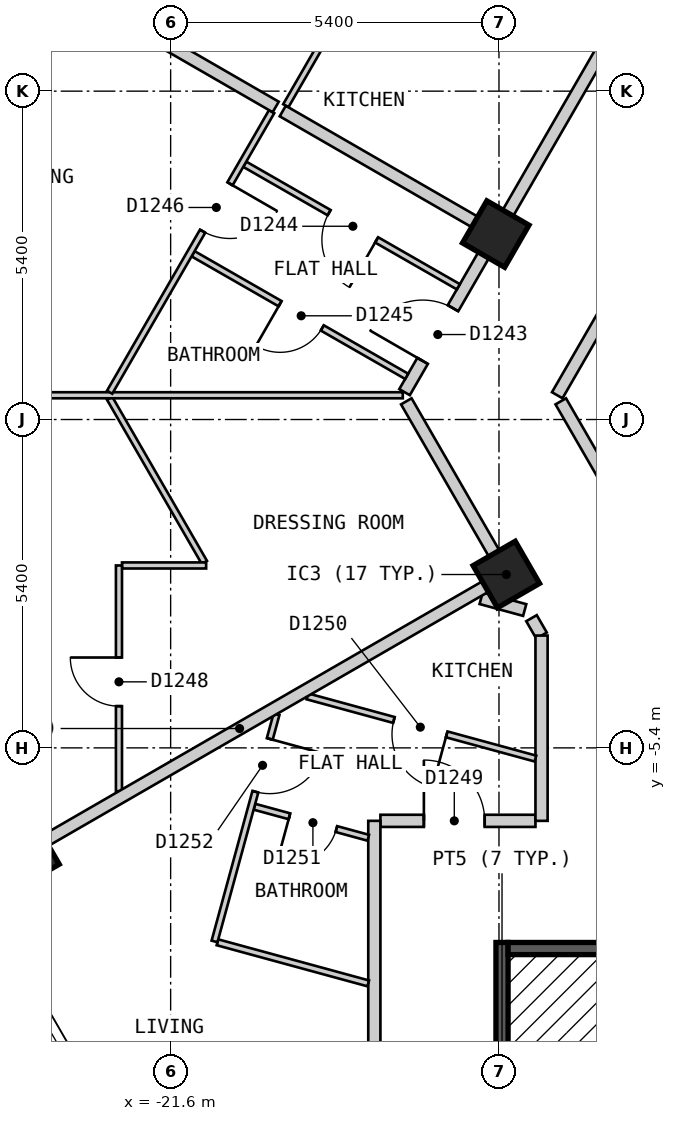
"""IFC4 building model, lengths in metres.
Left out: names, types, materials, properties, quantities, classifications, styles, units other than length and angle.
Written with IfcOpenShell. Run it as: python <this file> out.ifc"""

import sys

from ifc_helpers import new_model, si_unit, direction, frame, frame_2d, origin, origin_2d, place, context, subcontext, project, spatial, polyline, rectangle, outline, extrude, element, fill, save


model = new_model("IFC4")
c1 = context("Model", 3, precision=1e-05, world=origin(), true_north=direction((0.0, 1.0)))
c2 = subcontext(c1, "Body", "Model", "MODEL_VIEW")
j1 = project(units=[si_unit("LENGTHUNIT", "METRE"), si_unit("PLANEANGLEUNIT", "RADIAN")], contexts=[c1])
p1 = place(None, origin())
s1 = spatial("IfcSite", under=j1, at=p1, CompositionType="ELEMENT")
p2 = place(p1, origin())
s2 = spatial("IfcBuilding", under=s1, at=p2, CompositionType="ELEMENT")
p3 = place(p2, frame((0.0, 0.0, 117.6)))
s3 = spatial("IfcBuildingStorey", under=s2, at=p3, CompositionType="ELEMENT", Elevation=117.6)
p4 = place(p3, frame((-24.047, -7.149, 0.0), z_axis=(0.0, 0.0, 1.0), x_axis=(0.5, -0.866025403784, 0.0)))
e1 = element("IfcColumn", 1, at=p4, inside=s3, PredefinedType="COLUMN", context=c2, shape_type="SweptSolid", body=[
    extrude(rectangle(XDim=0.9, YDim=0.9, at=origin_2d()), origin(), (0.0, 0.0, 1.0), 3.0),
])
for number, where, z_axis, x_axis in (
    (2, (-16.079, -2.549, 0.0), (0.0, 0.0, 1.0), (0.5, -0.866, 0.0)),
    (3, (-16.253, 3.05, 0.0), (0.0, 0.0, 1.0), (-0.5, -0.866, 0.0)),
):
    element("IfcColumn", number, at=place(p3, frame(where, z_axis=z_axis, x_axis=x_axis)), inside=s3, PredefinedType="COLUMN", context=c2, shape_type="SweptSolid", body=[
        extrude(rectangle(XDim=0.8, YDim=0.8, at=origin_2d()), origin(), (0.0, 0.0, 1.0), 3.0),
    ])
p5 = place(p3, frame((-16.555, 23.025, 0.0), z_axis=(0.0, 0.0, 1.0), x_axis=(-0.500020536353, -0.866013546791, 0.0)))
e4 = element("IfcWall", 4, at=p5, inside=s3, PredefinedType="SOLIDWALL", context=c2, shape_type="SweptSolid", body=[
    extrude(outline(polyline([(0.0, -0.15), (23.325, -0.15), (23.245, 0.15), (0.08, 0.15), (0.0, -0.15)])), origin(), (0.0, 0.0, 1.0), 2.7),
])
p6 = place(p5, frame((2.685, 0.0, 0.15)))
e5 = element("IfcOpeningElement", 5, at=p6, cuts=e4, PredefinedType="OPENING", context=c2, shape_type="SweptSolid", body=[
    extrude(rectangle(XDim=1.5, YDim=2.1, at=frame_2d((0.75, 1.05))), frame((0.0, 0.16, 0.0), z_axis=(0.0, -1.0, 0.0), x_axis=(1.0, 0.0, 0.0)), (0.0, 0.0, 1.0), 0.32),
])
p7 = place(p5, frame((8.171, 0.0, 0.15)))
e6 = element("IfcOpeningElement", 6, at=p7, cuts=e4, PredefinedType="OPENING", context=c2, shape_type="SweptSolid", body=[
    extrude(rectangle(XDim=1.5, YDim=2.1, at=frame_2d((0.75, 1.05))), frame((0.0, 0.16, 0.0), z_axis=(0.0, -1.0, 0.0), x_axis=(1.0, 0.0, 0.0)), (0.0, 0.0, 1.0), 0.32),
])
p8 = place(p5, frame((13.655, 0.0, 0.15)))
e7 = element("IfcOpeningElement", 7, at=p8, cuts=e4, PredefinedType="OPENING", context=c2, shape_type="SweptSolid", body=[
    extrude(rectangle(XDim=1.5, YDim=2.1, at=frame_2d((0.75, 1.05))), frame((0.0, 0.16, 0.0), z_axis=(0.0, -1.0, 0.0), x_axis=(1.0, 0.0, 0.0)), (0.0, 0.0, 1.0), 0.32),
])
p9 = place(p5, frame((19.14, 0.0, 0.15)))
e8 = element("IfcOpeningElement", 8, at=p9, cuts=e4, PredefinedType="OPENING", context=c2, shape_type="SweptSolid", body=[
    extrude(rectangle(XDim=1.5, YDim=2.1, at=frame_2d((0.75, 1.05))), frame((0.0, 0.16, 0.0), z_axis=(0.0, -1.0, 0.0), x_axis=(1.0, 0.0, 0.0)), (0.0, 0.0, 1.0), 0.32),
])
p10 = place(p3, frame((-28.218, -2.025, 0.0), z_axis=(0.0, 0.0, 1.0), x_axis=(0.500017503135, -0.866015298109, 0.0)))
e9 = element("IfcWall", 9, at=p10, inside=s3, PredefinedType="SOLIDWALL", context=c2, shape_type="SweptSolid", body=[
    extrude(outline(polyline([(0.0, -0.15), (24.711, -0.15), (24.631, 0.15), (0.08, 0.15), (0.0, -0.15)])), origin(), (0.0, 0.0, 1.0), 2.7),
])
p11 = place(p10, frame((2.857, 0.0, 0.15)))
e10 = element("IfcOpeningElement", 10, at=p11, cuts=e9, PredefinedType="OPENING", context=c2, shape_type="SweptSolid", body=[
    extrude(rectangle(XDim=1.5, YDim=2.1, at=frame_2d((0.75, 1.05))), frame((0.0, 0.16, 0.0), z_axis=(0.0, -1.0, 0.0), x_axis=(1.0, 0.0, 0.0)), (0.0, 0.0, 1.0), 0.32),
])
p12 = place(p10, frame((8.689, 0.0, 0.15)))
e11 = element("IfcOpeningElement", 11, at=p12, cuts=e9, PredefinedType="OPENING", context=c2, shape_type="SweptSolid", body=[
    extrude(rectangle(XDim=1.5, YDim=2.1, at=frame_2d((0.75, 1.05))), frame((0.0, 0.16, 0.0), z_axis=(0.0, -1.0, 0.0), x_axis=(1.0, 0.0, 0.0)), (0.0, 0.0, 1.0), 0.32),
])
p13 = place(p10, frame((14.52, 0.0, 0.15)))
e12 = element("IfcOpeningElement", 12, at=p13, cuts=e9, PredefinedType="OPENING", context=c2, shape_type="SweptSolid", body=[
    extrude(rectangle(XDim=1.5, YDim=2.1, at=frame_2d((0.75, 1.05))), frame((0.0, 0.16, 0.0), z_axis=(0.0, -1.0, 0.0), x_axis=(1.0, 0.0, 0.0)), (0.0, 0.0, 1.0), 0.32),
])
p14 = place(p10, frame((20.351, 0.0, 0.15)))
e13 = element("IfcOpeningElement", 13, at=p14, cuts=e9, PredefinedType="OPENING", context=c2, shape_type="SweptSolid", body=[
    extrude(rectangle(XDim=1.5, YDim=2.1, at=frame_2d((0.75, 1.05))), frame((0.0, 0.16, 0.0), z_axis=(0.0, -1.0, 0.0), x_axis=(1.0, 0.0, 0.0)), (0.0, 0.0, 1.0), 0.32),
])
p15 = place(p3, frame((-15.184, 0.299, 0.0), z_axis=(0.0, 0.0, 1.0), x_axis=(0.500149577091, -0.865939028186, 0.0)))
e14 = element("IfcWall", 14, at=p15, inside=s3, PredefinedType="PARTITIONING", context=c2, shape_type="SweptSolid", body=[
    extrude(rectangle(XDim=3.463, YDim=0.2, at=frame_2d((1.732, 0.0))), origin(), (0.0, 0.0, 1.0), 2.7),
])
p16 = place(p3, frame((-17.724, 0.299, 0.0), z_axis=(0.0, 0.0, 1.0), x_axis=(0.499910220442, -0.866077231832, 0.0)))
e15 = element("IfcWall", 15, at=p16, inside=s3, PredefinedType="PARTITIONING", context=c2, shape_type="SweptSolid", body=[
    extrude(rectangle(XDim=3.189, YDim=0.2, at=frame_2d((1.594, 0.0))), origin(), (0.0, 0.0, 1.0), 2.7),
])
p17 = place(p3, frame((-15.665, -3.267, 0.0), z_axis=(0.0, 0.0, 1.0), x_axis=(0.499957196903, -0.866050114754, 0.0)))
e16 = element("IfcWall", 16, at=p17, inside=s3, PredefinedType="PARTITIONING", context=c2, shape_type="SweptSolid", body=[
    extrude(rectangle(XDim=0.33, YDim=0.2, at=frame_2d((0.165, 0.0))), origin(), (0.0, 0.0, 1.0), 2.7),
])
p18 = place(p3, frame((-18.15, -6.6, 0.0), z_axis=(0.0, 0.0, 1.0), x_axis=(1.0, 0.0, 0.0)))
e17 = element("IfcWall", 17, at=p18, inside=s3, PredefinedType="PARTITIONING", context=c2, shape_type="SweptSolid", body=[
    extrude(rectangle(XDim=2.55, YDim=0.2, at=frame_2d((1.275, 0.0))), origin(), (0.0, 0.0, 1.0), 2.7),
])
p19 = place(p18, frame((0.715, 0.0, 0.0)))
e18 = element("IfcOpeningElement", 18, at=p19, cuts=e17, PredefinedType="OPENING", context=c2, shape_type="SweptSolid", body=[
    extrude(rectangle(XDim=1.0, YDim=2.1, at=frame_2d((0.5, 1.05))), frame((0.0, 0.11, 0.0), z_axis=(0.0, -1.0, 0.0), x_axis=(1.0, 0.0, 0.0)), (0.0, 0.0, 1.0), 0.22),
])
p20 = place(p3, frame((-15.242, 0.399, 0.0), z_axis=(0.0, 0.0, 1.0), x_axis=(0.499953615651, 0.866052182145, 0.0)))
e19 = element("IfcWall", 19, at=p20, inside=s3, PredefinedType="PARTITIONING", context=c2, shape_type="SweptSolid", body=[
    extrude(rectangle(XDim=8.777, YDim=0.2, at=frame_2d((4.388, 0.0))), origin(), (0.0, 0.0, 1.0), 2.7),
])
p21 = place(p20, frame((3.938, 0.0, 0.0)))
e20 = element("IfcOpeningElement", 20, at=p21, cuts=e19, PredefinedType="OPENING", context=c2, shape_type="SweptSolid", body=[
    extrude(rectangle(XDim=0.9, YDim=2.1, at=frame_2d((0.45, 1.05))), frame((0.0, 0.11, 0.0), z_axis=(0.0, -1.0, 0.0), x_axis=(1.0, 0.0, 0.0)), (0.0, 0.0, 1.0), 0.22),
])
p22 = place(p3, frame((-17.753, 0.45, 0.0), z_axis=(0.0, 0.0, 1.0), x_axis=(0.499988552313, 0.866032013009, 0.0)))
e21 = element("IfcWall", 21, at=p22, inside=s3, PredefinedType="PARTITIONING", context=c2, shape_type="SweptSolid", body=[
    extrude(rectangle(XDim=16.917, YDim=0.2, at=frame_2d((8.458, 0.0))), origin(), (0.0, 0.0, 1.0), 2.7),
])
p23 = place(p22, frame((10.73, 0.0, 0.0)))
e22 = element("IfcOpeningElement", 22, at=p23, cuts=e21, PredefinedType="OPENING", context=c2, shape_type="SweptSolid", body=[
    extrude(rectangle(XDim=1.0, YDim=2.1, at=frame_2d((0.5, 1.05))), frame((0.0, 0.11, 0.0), z_axis=(0.0, -1.0, 0.0), x_axis=(1.0, 0.0, 0.0)), (0.0, 0.0, 1.0), 0.22),
])
p24 = place(p22, frame((0.594, 0.0, 0.0)))
e23 = element("IfcOpeningElement", 23, at=p24, cuts=e21, PredefinedType="OPENING", context=c2, shape_type="SweptSolid", body=[
    extrude(rectangle(XDim=1.0, YDim=2.1, at=frame_2d((0.5, 1.05))), frame((0.0, 0.11, 0.0), z_axis=(0.0, -1.0, 0.0), x_axis=(1.0, 0.0, 0.0)), (0.0, 0.0, 1.0), 0.22),
])
p25 = place(p3, frame((-15.5, -6.6, 0.0), z_axis=(0.0, 0.0, 1.0), x_axis=(0.0, 1.0, 0.0)))
e24 = element("IfcWall", 24, at=p25, inside=s3, PredefinedType="PARTITIONING", context=c2, shape_type="SweptSolid", body=[
    extrude(rectangle(XDim=3.047, YDim=0.2, at=frame_2d((1.523, 0.0))), origin(), (0.0, 0.0, 1.0), 2.7),
])
p26 = place(p3, frame((-18.25, -10.478, 0.0), z_axis=(0.0, 0.0, 1.0), x_axis=(0.0, 1.0, 0.0)))
e25 = element("IfcWall", 25, at=p26, inside=s3, PredefinedType="PARTITIONING", context=c2, shape_type="SweptSolid", body=[
    extrude(rectangle(XDim=3.878, YDim=0.2, at=frame_2d((1.939, 0.0))), origin(), (0.0, 0.0, 1.0), 2.7),
])
p27 = place(p3, frame((-22.603, 0.349, 0.0), z_axis=(0.0, 0.0, 1.0), x_axis=(0.499930403552, -0.866065581584, 0.0)))
e26 = element("IfcWall", 26, at=p27, inside=s3, PredefinedType="PARTITIONING", context=c2, shape_type="SweptSolid", body=[
    extrude(rectangle(XDim=3.117, YDim=0.1, at=frame_2d((1.558, 0.0))), origin(), (0.0, 0.0, 1.0), 2.7),
])
p28 = place(p3, frame((-19.351, -4.553, 0.0), z_axis=(0.0, 0.0, 1.0), x_axis=(0.964766719363, -0.263106779102, 0.0)))
e27 = element("IfcWall", 27, at=p28, inside=s3, PredefinedType="PARTITIONING", context=c2, shape_type="SweptSolid", body=[
    extrude(rectangle(XDim=3.888, YDim=0.1, at=frame_2d((1.944, 0.0))), origin(), (0.0, 0.0, 1.0), 2.7),
])
p29 = place(p28, frame((1.475, 0.0, 0.0)))
e28 = element("IfcOpeningElement", 28, at=p29, cuts=e27, PredefinedType="OPENING", context=c2, shape_type="SweptSolid", body=[
    extrude(rectangle(XDim=0.9, YDim=2.1, at=frame_2d((0.45, 1.05))), frame((0.0, 0.06, 0.0), z_axis=(0.0, -1.0, 0.0), x_axis=(1.0, 0.0, 0.0)), (0.0, 0.0, 1.0), 0.12),
])
p30 = place(p3, frame((-20.222, -6.368, 0.0), z_axis=(0.0, 0.0, 1.0), x_axis=(0.964827681618, -0.262883139024, 0.0)))
e29 = element("IfcWall", 29, at=p30, inside=s3, PredefinedType="PARTITIONING", context=c2, shape_type="SweptSolid", body=[
    extrude(rectangle(XDim=1.94, YDim=0.1, at=frame_2d((0.97, 0.0))), origin(), (0.0, 0.0, 1.0), 2.7),
])
p31 = place(p30, frame((0.597, 0.0, 0.0)))
e30 = element("IfcOpeningElement", 30, at=p31, cuts=e29, PredefinedType="OPENING", context=c2, shape_type="SweptSolid", body=[
    extrude(rectangle(XDim=0.8, YDim=2.1, at=frame_2d((0.4, 1.05))), frame((0.0, 0.06, 0.0), z_axis=(0.0, -1.0, 0.0), x_axis=(1.0, 0.0, 0.0)), (0.0, 0.0, 1.0), 0.12),
])
p32 = place(p3, frame((-20.83, -8.597, 0.0), z_axis=(0.0, 0.0, 1.0), x_axis=(0.964796691053, -0.262996853468, 0.0)))
e31 = element("IfcWall", 31, at=p32, inside=s3, PredefinedType="PARTITIONING", context=c2, shape_type="SweptSolid", body=[
    extrude(rectangle(XDim=2.571, YDim=0.1, at=frame_2d((1.285, 0.0))), origin(), (0.0, 0.0, 1.0), 2.7),
])
p33 = place(p3, frame((-20.381, 4.198, 0.0), z_axis=(0.0, 0.0, 1.0), x_axis=(0.867459321792, -0.497508115549, 0.0)))
e32 = element("IfcWall", 32, at=p33, inside=s3, PredefinedType="PARTITIONING", context=c2, shape_type="SweptSolid", body=[
    extrude(rectangle(XDim=4.05, YDim=0.1, at=frame_2d((2.025, 0.0))), origin(), (0.0, 0.0, 1.0), 2.7),
])
p34 = place(p33, frame((1.6, 0.0, 0.0)))
e33 = element("IfcOpeningElement", 33, at=p34, cuts=e32, PredefinedType="OPENING", context=c2, shape_type="SweptSolid", body=[
    extrude(rectangle(XDim=0.9, YDim=2.1, at=frame_2d((0.45, 1.05))), frame((0.0, 0.06, 0.0), z_axis=(0.0, -1.0, 0.0), x_axis=(1.0, 0.0, 0.0)), (0.0, 0.0, 1.0), 0.12),
])
p35 = place(p3, frame((-21.231, 2.726, 0.0), z_axis=(0.0, 0.0, 1.0), x_axis=(0.867314299312, -0.497760892607, 0.0)))
e34 = element("IfcWall", 34, at=p35, inside=s3, PredefinedType="PARTITIONING", context=c2, shape_type="SweptSolid", body=[
    extrude(rectangle(XDim=4.05, YDim=0.1, at=frame_2d((2.025, 0.0))), origin(), (0.0, 0.0, 1.0), 2.7),
])
p36 = place(p35, frame((1.65, 0.0, 0.0)))
e35 = element("IfcOpeningElement", 35, at=p36, cuts=e34, PredefinedType="OPENING", context=c2, shape_type="SweptSolid", body=[
    extrude(rectangle(XDim=0.8, YDim=2.1, at=frame_2d((0.4, 1.05))), frame((0.0, 0.06, 0.0), z_axis=(0.0, -1.0, 0.0), x_axis=(1.0, 0.0, 0.0)), (0.0, 0.0, 1.0), 0.12),
])
p37 = place(p3, frame((-22.4, -2.4, 0.0), z_axis=(0.0, 0.0, 1.0), x_axis=(1.0, 0.0, 0.0)))
e36 = element("IfcWall", 36, at=p37, inside=s3, PredefinedType="PARTITIONING", context=c2, shape_type="SweptSolid", body=[
    extrude(rectangle(XDim=1.384, YDim=0.1, at=frame_2d((0.692, 0.0))), origin(), (0.0, 0.0, 1.0), 2.7),
])
p38 = place(p3, frame((-28.048, 0.399, 0.0), z_axis=(0.0, 0.0, 1.0), x_axis=(1.0, 0.0, 0.0)))
e37 = element("IfcWall", 37, at=p38, inside=s3, PredefinedType="PARTITIONING", context=c2, shape_type="SweptSolid", body=[
    extrude(rectangle(XDim=10.266, YDim=0.1, at=frame_2d((5.133, 0.0))), origin(), (0.0, 0.0, 1.0), 2.7),
])
p39 = place(p38, frame((2.258, 0.0, 0.0)))
e38 = element("IfcOpeningElement", 38, at=p39, cuts=e37, PredefinedType="OPENING", context=c2, shape_type="SweptSolid", body=[
    extrude(rectangle(XDim=0.9, YDim=2.1, at=frame_2d((0.45, 1.05))), frame((0.0, 0.06, 0.0), z_axis=(0.0, -1.0, 0.0), x_axis=(1.0, 0.0, 0.0)), (0.0, 0.0, 1.0), 0.12),
])
p40 = place(p3, frame((-19.706, 5.16, 0.0), z_axis=(0.0, 0.0, 1.0), x_axis=(0.500003799672, 0.866023210032, 0.0)))
e39 = element("IfcWall", 39, at=p40, inside=s3, PredefinedType="PARTITIONING", context=c2, shape_type="SweptSolid", body=[
    extrude(rectangle(XDim=16.15, YDim=0.1, at=frame_2d((8.075, 0.0))), origin(), (0.0, 0.0, 1.0), 2.7),
])
p41 = place(p40, frame((7.677, 0.0, 0.0)))
e40 = element("IfcOpeningElement", 40, at=p41, cuts=e39, PredefinedType="OPENING", context=c2, shape_type="SweptSolid", body=[
    extrude(rectangle(XDim=0.9, YDim=2.1, at=frame_2d((0.45, 1.05))), frame((0.0, 0.06, 0.0), z_axis=(0.0, -1.0, 0.0), x_axis=(1.0, 0.0, 0.0)), (0.0, 0.0, 1.0), 0.12),
])
p42 = place(p3, frame((-22.603, 0.449, 0.0), z_axis=(0.0, 0.0, 1.0), x_axis=(0.500022588228, 0.866012362072, 0.0)))
e41 = element("IfcWall", 41, at=p42, inside=s3, PredefinedType="PARTITIONING", context=c2, shape_type="SweptSolid", body=[
    extrude(rectangle(XDim=5.328, YDim=0.1, at=frame_2d((2.664, 0.0))), origin(), (0.0, 0.0, 1.0), 2.7),
])
p43 = place(p42, frame((3.058, 0.0, 0.0)))
e42 = element("IfcOpeningElement", 42, at=p43, cuts=e41, PredefinedType="OPENING", context=c2, shape_type="SweptSolid", body=[
    extrude(rectangle(XDim=0.9, YDim=2.1, at=frame_2d((0.45, 1.05))), frame((0.0, 0.06, 0.0), z_axis=(0.0, -1.0, 0.0), x_axis=(1.0, 0.0, 0.0)), (0.0, 0.0, 1.0), 0.12),
])
p44 = place(p3, frame((-20.878, -8.583, 0.0), z_axis=(0.0, 0.0, 1.0), x_axis=(0.263144077993, 0.964756546605, 0.0)))
e43 = element("IfcWall", 43, at=p44, inside=s3, PredefinedType="PARTITIONING", context=c2, shape_type="SweptSolid", body=[
    extrude(rectangle(XDim=3.873, YDim=0.1, at=frame_2d((1.936, 0.0))), origin(), (0.0, 0.0, 1.0), 2.7),
])
p45 = place(p44, frame((2.552, 0.0, 0.0)))
e44 = element("IfcOpeningElement", 44, at=p45, cuts=e43, PredefinedType="OPENING", context=c2, shape_type="SweptSolid", body=[
    extrude(rectangle(XDim=0.9, YDim=2.1, at=frame_2d((0.45, 1.05))), frame((0.0, 0.06, 0.0), z_axis=(0.0, -1.0, 0.0), x_axis=(1.0, 0.0, 0.0)), (0.0, 0.0, 1.0), 0.12),
])
p46 = place(p3, frame((-22.45, -6.112, 0.0), z_axis=(0.0, 0.0, 1.0), x_axis=(0.0, 1.0, 0.0)))
e45 = element("IfcWall", 45, at=p46, inside=s3, PredefinedType="PARTITIONING", context=c2, shape_type="SweptSolid", body=[
    extrude(rectangle(XDim=3.712, YDim=0.1, at=frame_2d((1.856, 0.0))), origin(), (0.0, 0.0, 1.0), 2.7),
])
p47 = place(p46, frame((1.398, 0.0, 0.0)))
e46 = element("IfcOpeningElement", 46, at=p47, cuts=e45, PredefinedType="OPENING", context=c2, shape_type="SweptSolid", body=[
    extrude(rectangle(XDim=0.8, YDim=2.1, at=frame_2d((0.4, 1.05))), frame((0.0, 0.06, 0.0), z_axis=(0.0, -1.0, 0.0), x_axis=(1.0, 0.0, 0.0)), (0.0, 0.0, 1.0), 0.12),
])
p48 = place(p3, frame((-16.493, -2.938, 0.0), z_axis=(0.0, 0.0, 1.0), x_axis=(0.964816958114, -0.262922493019, 0.0)))
e47 = element("IfcWall", 47, at=p48, inside=s3, PredefinedType="PARTITIONING", context=c2, shape_type="SweptSolid", body=[
    extrude(rectangle(XDim=0.742, YDim=0.2, at=frame_2d((0.371, 0.0))), origin(), (0.0, 0.0, 1.0), 2.7),
])
p49 = place(p3, frame((-24.999, 8.1, 0.0), z_axis=(0.0, 0.0, 1.0), x_axis=(0.866013897511, -0.50001992892, 0.0)))
e48 = element("IfcWall", 48, at=p49, inside=s3, PredefinedType="PARTITIONING", context=c2, shape_type="SweptSolid", body=[
    extrude(rectangle(XDim=5.92, YDim=0.2, at=frame_2d((2.96, 0.0))), origin(), (0.0, 0.0, 1.0), 2.7),
])
p50 = place(p3, frame((-19.756, 5.073, 0.0), z_axis=(0.0, 0.0, 1.0), x_axis=(0.866014535457, -0.500018824023, 0.0)))
e49 = element("IfcWall", 49, at=p50, inside=s3, PredefinedType="PARTITIONING", context=c2, shape_type="SweptSolid", body=[
    extrude(rectangle(XDim=3.946, YDim=0.2, at=frame_2d((1.973, 0.0))), origin(), (0.0, 0.0, 1.0), 2.7),
])
p51 = place(p3, frame((-24.826, -7.599, 0.0), z_axis=(0.0, 0.0, 1.0), x_axis=(0.86599621094, 0.500050560081, 0.0)))
e50 = element("IfcWall", 50, at=p51, inside=s3, PredefinedType="PARTITIONING", context=c2, shape_type="SweptSolid", body=[
    extrude(rectangle(XDim=10.069, YDim=0.2, at=frame_2d((5.035, 0.0))), origin(), (0.0, 0.0, 1.0), 2.7),
])
p52 = place(p3, frame((-16.15, -14.4, 0.0), z_axis=(0.0, 0.0, 1.0), x_axis=(0.0, 1.0, 0.0)))
e51 = element("IfcWall", 51, at=p52, inside=s3, PredefinedType="SOLIDWALL", context=c2, shape_type="SweptSolid", body=[
    extrude(rectangle(XDim=5.8, YDim=0.2, at=frame_2d((2.9, 0.0))), origin(), (0.0, 0.0, 1.0), 2.7),
])
p53 = place(p3, frame((-16.05, -8.7, 0.0), z_axis=(0.0, 0.0, 1.0), x_axis=(1.0, 0.0, 0.0)))
e52 = element("IfcWall", 52, at=p53, inside=s3, PredefinedType="SOLIDWALL", context=c2, shape_type="SweptSolid", body=[
    extrude(rectangle(XDim=2.75, YDim=0.2, at=frame_2d((1.375, 0.0))), origin(), (0.0, 0.0, 1.0), 2.7),
])
p54 = place(p12, origin())
e53 = element("IfcWindow", 53, at=p54, inside=s3, PartitioningType="SINGLE_PANEL", PredefinedType="WINDOW", context=c2, shape_type="SweptSolid", body=[
    extrude(rectangle(XDim=1.5, YDim=2.1, at=frame_2d((0.75, 1.05))), frame((0.0, 0.03, 0.0), z_axis=(0.0, -1.0, 0.0), x_axis=(1.0, 0.0, 0.0)), (0.0, 0.0, 1.0), 0.06),
])
fill(e11, e53)
p55 = place(p24, origin())
e54 = element("IfcDoor", 54, at=p55, inside=s3, OperationType="SINGLE_SWING_LEFT", PredefinedType="DOOR", context=c2, shape_type="SweptSolid", body=[
    extrude(rectangle(XDim=1.0, YDim=2.1, at=frame_2d((0.5, 1.05))), frame((0.0, 0.025, 0.0), z_axis=(0.0, -1.0, 0.0), x_axis=(1.0, 0.0, 0.0)), (0.0, 0.0, 1.0), 0.05),
])
fill(e23, e54)
p56 = place(p34, origin())
e55 = element("IfcDoor", 55, at=p56, inside=s3, OperationType="SINGLE_SWING_RIGHT", PredefinedType="DOOR", context=c2, shape_type="SweptSolid", body=[
    extrude(rectangle(XDim=0.9, YDim=2.1, at=frame_2d((0.45, 1.05))), frame((0.0, 0.025, 0.0), z_axis=(0.0, -1.0, 0.0), x_axis=(1.0, 0.0, 0.0)), (0.0, 0.0, 1.0), 0.05),
])
fill(e33, e55)
p57 = place(p36, origin())
e56 = element("IfcDoor", 56, at=p57, inside=s3, OperationType="SINGLE_SWING_LEFT", PredefinedType="DOOR", context=c2, shape_type="SweptSolid", body=[
    extrude(rectangle(XDim=0.8, YDim=2.1, at=frame_2d((0.4, 1.05))), frame((0.0, 0.025, 0.0), z_axis=(0.0, -1.0, 0.0), x_axis=(1.0, 0.0, 0.0)), (0.0, 0.0, 1.0), 0.05),
])
fill(e35, e56)
p58 = place(p43, origin())
e57 = element("IfcDoor", 57, at=p58, inside=s3, OperationType="SINGLE_SWING_RIGHT", PredefinedType="DOOR", context=c2, shape_type="SweptSolid", body=[
    extrude(rectangle(XDim=0.9, YDim=2.1, at=frame_2d((0.45, 1.05))), frame((0.0, 0.025, 0.0), z_axis=(0.0, -1.0, 0.0), x_axis=(1.0, 0.0, 0.0)), (0.0, 0.0, 1.0), 0.05),
])
fill(e42, e57)
p59 = place(p47, origin())
e58 = element("IfcDoor", 58, at=p59, inside=s3, OperationType="SINGLE_SWING_RIGHT", PredefinedType="DOOR", context=c2, shape_type="SweptSolid", body=[
    extrude(rectangle(XDim=0.8, YDim=2.1, at=frame_2d((0.4, 1.05))), frame((0.0, 0.025, 0.0), z_axis=(0.0, -1.0, 0.0), x_axis=(1.0, 0.0, 0.0)), (0.0, 0.0, 1.0), 0.05),
])
fill(e46, e58)
p60 = place(p19, origin())
e59 = element("IfcDoor", 59, at=p60, inside=s3, OperationType="SINGLE_SWING_LEFT", PredefinedType="DOOR", context=c2, shape_type="SweptSolid", body=[
    extrude(rectangle(XDim=1.0, YDim=2.1, at=frame_2d((0.5, 1.05))), frame((0.0, 0.025, 0.0), z_axis=(0.0, -1.0, 0.0), x_axis=(1.0, 0.0, 0.0)), (0.0, 0.0, 1.0), 0.05),
])
fill(e18, e59)
p61 = place(p29, origin())
e60 = element("IfcDoor", 60, at=p61, inside=s3, OperationType="SINGLE_SWING_RIGHT", PredefinedType="DOOR", context=c2, shape_type="SweptSolid", body=[
    extrude(rectangle(XDim=0.9, YDim=2.1, at=frame_2d((0.45, 1.05))), frame((0.0, 0.025, 0.0), z_axis=(0.0, -1.0, 0.0), x_axis=(1.0, 0.0, 0.0)), (0.0, 0.0, 1.0), 0.05),
])
fill(e28, e60)
p62 = place(p31, origin())
e61 = element("IfcDoor", 61, at=p62, inside=s3, OperationType="SINGLE_SWING_LEFT", PredefinedType="DOOR", context=c2, shape_type="SweptSolid", body=[
    extrude(rectangle(XDim=0.8, YDim=2.1, at=frame_2d((0.4, 1.05))), frame((0.0, 0.025, 0.0), z_axis=(0.0, -1.0, 0.0), x_axis=(1.0, 0.0, 0.0)), (0.0, 0.0, 1.0), 0.05),
])
fill(e30, e61)
p63 = place(p45, origin())
e62 = element("IfcDoor", 62, at=p63, inside=s3, OperationType="SINGLE_SWING_RIGHT", PredefinedType="DOOR", context=c2, shape_type="SweptSolid", body=[
    extrude(rectangle(XDim=0.9, YDim=2.1, at=frame_2d((0.45, 1.05))), frame((0.0, 0.025, 0.0), z_axis=(0.0, -1.0, 0.0), x_axis=(1.0, 0.0, 0.0)), (0.0, 0.0, 1.0), 0.05),
])
fill(e44, e62)
save(model, sys.argv[1])
